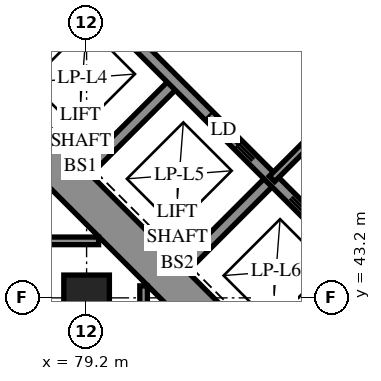
"""IFC4 building model, lengths in metres.
Left out: names, types, materials, properties, quantities, classifications, styles, units other than length and angle.
Written with IfcOpenShell. Run it as: python <this file> out.ifc"""

import sys

from ifc_helpers import new_model, si_unit, direction, frame, frame_2d, origin, origin_2d, place, context, subcontext, project, spatial, polyline, rectangle, outline, extrude, element, fill, save


model = new_model("IFC4")
c1 = context("Model", 3, precision=1e-05, world=origin(), true_north=direction((0.0, 1.0)))
c2 = subcontext(c1, "Body", "Model", "MODEL_VIEW")
j1 = project(units=[si_unit("LENGTHUNIT", "METRE"), si_unit("PLANEANGLEUNIT", "RADIAN")], contexts=[c1])
p1 = place(None, origin())
s1 = spatial("IfcSite", under=j1, at=p1, CompositionType="ELEMENT")
p2 = place(p1, origin())
s2 = spatial("IfcBuilding", under=s1, at=p2, CompositionType="ELEMENT")
p3 = place(p2, frame((0.0, 0.0, 22.8)))
s3 = spatial("IfcBuildingStorey", under=s2, at=p3, CompositionType="ELEMENT", Elevation=22.8)
p4 = place(p3, frame((79.2, 43.2, 0.0), z_axis=(0.0, 0.0, 1.0), x_axis=(1.0, 0.0, 0.0)))
e1 = element("IfcColumn", 1, at=p4, inside=s3, PredefinedType="COLUMN", context=c2, shape_type="SweptSolid", body=[
    extrude(rectangle(XDim=1.2, YDim=1.2, at=origin_2d()), origin(), (0.0, 0.0, 1.0), 3.9),
])
p5 = place(p3, frame((75.594, 49.443, -0.4), z_axis=(0.0, 0.0, 1.0), x_axis=(0.7071037324, -0.70710983, 0.0)))
e2 = element("IfcWall", 2, at=p5, inside=s3, PredefinedType="SHEAR", context=c2, shape_type="SweptSolid", body=[
    extrude(rectangle(XDim=16.4, YDim=1.0, at=frame_2d((8.2, 0.0))), origin(), (0.0, 0.0, 1.0), 3.6),
])
p6 = place(p3, frame((76.301, 49.443, -0.4), z_axis=(0.0, 0.0, 1.0), x_axis=(0.7071067812, 0.7071067812, 0.0)))
e3 = element("IfcWall", 3, at=p6, inside=s3, PredefinedType="SHEAR", context=c2, shape_type="SweptSolid", body=[
    extrude(rectangle(XDim=14.4, YDim=1.0, at=frame_2d((7.2, 0.0))), origin(), (0.0, 0.0, 1.0), 3.6),
])
p7 = place(p6, frame((4.55, 0.0, 0.4)))
e4 = element("IfcOpeningElement", 4, at=p7, cuts=e3, PredefinedType="OPENING", context=c2, shape_type="SweptSolid", body=[
    extrude(rectangle(XDim=1.1, YDim=2.1, at=frame_2d((0.55, 1.05))), frame((0.0, 0.51, 0.0), z_axis=(0.0, -1.0, 0.0), x_axis=(1.0, 0.0, 0.0)), (0.0, 0.0, 1.0), 1.02),
])
p8 = place(p6, frame((11.35, 0.0, 0.4)))
e5 = element("IfcOpeningElement", 5, at=p8, cuts=e3, PredefinedType="OPENING", context=c2, shape_type="SweptSolid", body=[
    extrude(rectangle(XDim=1.1, YDim=2.1, at=frame_2d((0.55, 1.05))), frame((0.0, 0.51, 0.0), z_axis=(0.0, -1.0, 0.0), x_axis=(1.0, 0.0, 0.0)), (0.0, 0.0, 1.0), 1.02),
])
p9 = place(p3, frame((79.2, 46.544, 0.0), z_axis=(0.0, 0.0, 1.0), x_axis=(0.7071219326, 0.7070916295, 0.0)))
e6 = element("IfcWall", 6, at=p9, inside=s3, PredefinedType="SOLIDWALL", context=c2, shape_type="SweptSolid", body=[
    extrude(rectangle(XDim=3.3, YDim=0.3, at=frame_2d((1.65, 0.0))), origin(), (0.0, 0.0, 1.0), 3.9),
])
for number, where, z_axis, x_axis in (
    (7, (81.746, 43.999, 0.0), (0.0, 0.0, 1.0), (0.707, 0.707, 0.0)),
    (8, (84.291, 41.453, 0.0), (0.0, 0.0, 1.0), (0.707, 0.707, 0.0)),
):
    element("IfcWall", number, at=place(p3, frame(where, z_axis=z_axis, x_axis=x_axis)), inside=s3, PredefinedType="SOLIDWALL", context=c2, shape_type="SweptSolid", body=[
        extrude(rectangle(XDim=3.3, YDim=0.3, at=frame_2d((1.65, 0.0))), origin(), (0.0, 0.0, 1.0), 3.9),
    ])
p10 = place(p3, frame((78.988, 51.423, 0.0), z_axis=(0.0, 0.0, 1.0), x_axis=(0.7071067812, -0.7071067812, 0.0)))
e9 = element("IfcWall", 9, at=p10, inside=s3, PredefinedType="SOLIDWALL", context=c2, shape_type="SweptSolid", body=[
    extrude(rectangle(XDim=14.4, YDim=0.3, at=frame_2d((7.2, 0.0))), origin(), (0.0, 0.0, 1.0), 3.9),
])
p11 = place(p10, frame((1.25, 0.0, 0.0)))
e10 = element("IfcOpeningElement", 10, at=p11, cuts=e9, PredefinedType="OPENING", context=c2, shape_type="SweptSolid", body=[
    extrude(rectangle(XDim=1.1, YDim=2.1, at=frame_2d((0.55, 1.05))), frame((0.0, 0.16, 0.0), z_axis=(0.0, -1.0, 0.0), x_axis=(1.0, 0.0, 0.0)), (0.0, 0.0, 1.0), 0.32),
])
p12 = place(p10, frame((4.85, 0.0, 0.0)))
e11 = element("IfcOpeningElement", 11, at=p12, cuts=e9, PredefinedType="OPENING", context=c2, shape_type="SweptSolid", body=[
    extrude(rectangle(XDim=1.1, YDim=2.1, at=frame_2d((0.55, 1.05))), frame((0.0, 0.16, 0.0), z_axis=(0.0, -1.0, 0.0), x_axis=(1.0, 0.0, 0.0)), (0.0, 0.0, 1.0), 0.32),
])
p13 = place(p10, frame((8.45, 0.0, 0.0)))
e12 = element("IfcOpeningElement", 12, at=p13, cuts=e9, PredefinedType="OPENING", context=c2, shape_type="SweptSolid", body=[
    extrude(rectangle(XDim=1.1, YDim=2.1, at=frame_2d((0.55, 1.05))), frame((0.0, 0.16, 0.0), z_axis=(0.0, -1.0, 0.0), x_axis=(1.0, 0.0, 0.0)), (0.0, 0.0, 1.0), 0.32),
])
p14 = place(p10, frame((12.05, 0.0, 0.0)))
e13 = element("IfcOpeningElement", 13, at=p14, cuts=e9, PredefinedType="OPENING", context=c2, shape_type="SweptSolid", body=[
    extrude(rectangle(XDim=1.1, YDim=2.1, at=frame_2d((0.55, 1.05))), frame((0.0, 0.16, 0.0), z_axis=(0.0, -1.0, 0.0), x_axis=(1.0, 0.0, 0.0)), (0.0, 0.0, 1.0), 0.32),
])
p15 = place(p3, frame((81.534, 53.969, 0.0), z_axis=(0.0, 0.0, 1.0), x_axis=(0.707103309, -0.7071102534, 0.0)))
e14 = element("IfcWall", 14, at=p15, inside=s3, PredefinedType="SOLIDWALL", context=c2, shape_type="SweptSolid", body=[
    extrude(rectangle(XDim=14.4, YDim=0.3, at=frame_2d((7.2, 0.0))), origin(), (0.0, 0.0, 1.0), 3.9),
])
p16 = place(p15, frame((12.05, 0.0, 0.0)))
e15 = element("IfcOpeningElement", 15, at=p16, cuts=e14, PredefinedType="OPENING", context=c2, shape_type="SweptSolid", body=[
    extrude(rectangle(XDim=1.1, YDim=2.1, at=frame_2d((0.55, 1.05))), frame((0.0, 0.16, 0.0), z_axis=(0.0, -1.0, 0.0), x_axis=(1.0, 0.0, 0.0)), (0.0, 0.0, 1.0), 0.32),
])
p17 = place(p3, frame((117.843, 34.665, 0.0), z_axis=(0.0, 0.0, 1.0), x_axis=(-0.7071067812, 0.7071067812, 0.0)))
e16 = element("IfcWall", 16, at=p17, inside=s3, PredefinedType="SOLIDWALL", context=c2, shape_type="SweptSolid", body=[
    extrude(outline(polyline([(-0.275, -0.275), (54.222, -0.275), (53.994, 0.275), (0.275, 0.275), (-0.275, -0.275)])), origin(), (0.0, 0.0, 1.0), 3.9),
])
p18 = place(p17, frame((0.8, 0.0, 0.7)))
e17 = element("IfcOpeningElement", 17, at=p18, cuts=e16, PredefinedType="OPENING", context=c2, shape_type="SweptSolid", body=[
    extrude(rectangle(XDim=1.8, YDim=2.4, at=frame_2d((0.9, 1.2))), frame((0.0, 0.285, 0.0), z_axis=(0.0, -1.0, 0.0), x_axis=(1.0, 0.0, 0.0)), (0.0, 0.0, 1.0), 0.57),
])
p19 = place(p17, frame((4.225, 0.0, 0.7)))
e18 = element("IfcOpeningElement", 18, at=p19, cuts=e16, PredefinedType="OPENING", context=c2, shape_type="SweptSolid", body=[
    extrude(rectangle(XDim=1.8, YDim=2.4, at=frame_2d((0.9, 1.2))), frame((0.0, 0.285, 0.0), z_axis=(0.0, -1.0, 0.0), x_axis=(1.0, 0.0, 0.0)), (0.0, 0.0, 1.0), 0.57),
])
p20 = place(p17, frame((7.825, 0.0, 0.7)))
e19 = element("IfcOpeningElement", 19, at=p20, cuts=e16, PredefinedType="OPENING", context=c2, shape_type="SweptSolid", body=[
    extrude(rectangle(XDim=1.8, YDim=2.4, at=frame_2d((0.9, 1.2))), frame((0.0, 0.285, 0.0), z_axis=(0.0, -1.0, 0.0), x_axis=(1.0, 0.0, 0.0)), (0.0, 0.0, 1.0), 0.57),
])
p21 = place(p17, frame((11.425, 0.0, 0.7)))
e20 = element("IfcOpeningElement", 20, at=p21, cuts=e16, PredefinedType="OPENING", context=c2, shape_type="SweptSolid", body=[
    extrude(rectangle(XDim=1.8, YDim=2.4, at=frame_2d((0.9, 1.2))), frame((0.0, 0.285, 0.0), z_axis=(0.0, -1.0, 0.0), x_axis=(1.0, 0.0, 0.0)), (0.0, 0.0, 1.0), 0.57),
])
p22 = place(p17, frame((15.025, 0.0, 0.7)))
e21 = element("IfcOpeningElement", 21, at=p22, cuts=e16, PredefinedType="OPENING", context=c2, shape_type="SweptSolid", body=[
    extrude(rectangle(XDim=1.8, YDim=2.4, at=frame_2d((0.9, 1.2))), frame((0.0, 0.285, 0.0), z_axis=(0.0, -1.0, 0.0), x_axis=(1.0, 0.0, 0.0)), (0.0, 0.0, 1.0), 0.57),
])
p23 = place(p17, frame((18.625, 0.0, 0.7)))
e22 = element("IfcOpeningElement", 22, at=p23, cuts=e16, PredefinedType="OPENING", context=c2, shape_type="SweptSolid", body=[
    extrude(rectangle(XDim=1.8, YDim=2.4, at=frame_2d((0.9, 1.2))), frame((0.0, 0.285, 0.0), z_axis=(0.0, -1.0, 0.0), x_axis=(1.0, 0.0, 0.0)), (0.0, 0.0, 1.0), 0.57),
])
p24 = place(p17, frame((22.225, 0.0, 0.7)))
e23 = element("IfcOpeningElement", 23, at=p24, cuts=e16, PredefinedType="OPENING", context=c2, shape_type="SweptSolid", body=[
    extrude(rectangle(XDim=1.8, YDim=2.4, at=frame_2d((0.9, 1.2))), frame((0.0, 0.285, 0.0), z_axis=(0.0, -1.0, 0.0), x_axis=(1.0, 0.0, 0.0)), (0.0, 0.0, 1.0), 0.57),
])
p25 = place(p17, frame((25.825, 0.0, 0.7)))
e24 = element("IfcOpeningElement", 24, at=p25, cuts=e16, PredefinedType="OPENING", context=c2, shape_type="SweptSolid", body=[
    extrude(rectangle(XDim=1.8, YDim=2.4, at=frame_2d((0.9, 1.2))), frame((0.0, 0.285, 0.0), z_axis=(0.0, -1.0, 0.0), x_axis=(1.0, 0.0, 0.0)), (0.0, 0.0, 1.0), 0.57),
])
p26 = place(p17, frame((29.425, 0.0, 0.7)))
e25 = element("IfcOpeningElement", 25, at=p26, cuts=e16, PredefinedType="OPENING", context=c2, shape_type="SweptSolid", body=[
    extrude(rectangle(XDim=1.8, YDim=2.4, at=frame_2d((0.9, 1.2))), frame((0.0, 0.285, 0.0), z_axis=(0.0, -1.0, 0.0), x_axis=(1.0, 0.0, 0.0)), (0.0, 0.0, 1.0), 0.57),
])
p27 = place(p17, frame((33.025, 0.0, 0.7)))
e26 = element("IfcOpeningElement", 26, at=p27, cuts=e16, PredefinedType="OPENING", context=c2, shape_type="SweptSolid", body=[
    extrude(rectangle(XDim=1.8, YDim=2.4, at=frame_2d((0.9, 1.2))), frame((0.0, 0.285, 0.0), z_axis=(0.0, -1.0, 0.0), x_axis=(1.0, 0.0, 0.0)), (0.0, 0.0, 1.0), 0.57),
])
p28 = place(p17, frame((36.625, 0.0, 0.7)))
e27 = element("IfcOpeningElement", 27, at=p28, cuts=e16, PredefinedType="OPENING", context=c2, shape_type="SweptSolid", body=[
    extrude(rectangle(XDim=1.8, YDim=2.4, at=frame_2d((0.9, 1.2))), frame((0.0, 0.285, 0.0), z_axis=(0.0, -1.0, 0.0), x_axis=(1.0, 0.0, 0.0)), (0.0, 0.0, 1.0), 0.57),
])
p29 = place(p17, frame((40.225, 0.0, 0.7)))
e28 = element("IfcOpeningElement", 28, at=p29, cuts=e16, PredefinedType="OPENING", context=c2, shape_type="SweptSolid", body=[
    extrude(rectangle(XDim=1.8, YDim=2.4, at=frame_2d((0.9, 1.2))), frame((0.0, 0.285, 0.0), z_axis=(0.0, -1.0, 0.0), x_axis=(1.0, 0.0, 0.0)), (0.0, 0.0, 1.0), 0.57),
])
p30 = place(p17, frame((43.825, 0.0, 0.7)))
e29 = element("IfcOpeningElement", 29, at=p30, cuts=e16, PredefinedType="OPENING", context=c2, shape_type="SweptSolid", body=[
    extrude(rectangle(XDim=1.8, YDim=2.4, at=frame_2d((0.9, 1.2))), frame((0.0, 0.285, 0.0), z_axis=(0.0, -1.0, 0.0), x_axis=(1.0, 0.0, 0.0)), (0.0, 0.0, 1.0), 0.57),
])
p31 = place(p17, frame((47.425, 0.0, 0.7)))
e30 = element("IfcOpeningElement", 30, at=p31, cuts=e16, PredefinedType="OPENING", context=c2, shape_type="SweptSolid", body=[
    extrude(rectangle(XDim=1.8, YDim=2.4, at=frame_2d((0.9, 1.2))), frame((0.0, 0.285, 0.0), z_axis=(0.0, -1.0, 0.0), x_axis=(1.0, 0.0, 0.0)), (0.0, 0.0, 1.0), 0.57),
])
p32 = place(p17, frame((51.06, 0.0, 0.7)))
e31 = element("IfcOpeningElement", 31, at=p32, cuts=e16, PredefinedType="OPENING", context=c2, shape_type="SweptSolid", body=[
    extrude(rectangle(XDim=1.8, YDim=2.4, at=frame_2d((0.9, 1.2))), frame((0.0, 0.285, 0.0), z_axis=(0.0, -1.0, 0.0), x_axis=(1.0, 0.0, 0.0)), (0.0, 0.0, 1.0), 0.57),
])
p33 = place(p3, frame((84.079, 46.332, 0.0), z_axis=(0.0, 0.0, 1.0), x_axis=(0.7071067812, 0.7071067812, 0.0)))
e32 = element("IfcWall", 32, at=p33, inside=s3, PredefinedType="PARTITIONING", context=c2, shape_type="SweptSolid", body=[
    extrude(rectangle(XDim=3.6, YDim=0.2, at=frame_2d((1.8, 0.0))), origin(), (0.0, 0.0, 1.0), 3.9),
])
for number, where, z_axis, x_axis in (
    (33, (77.702, 44.7, 0.0), (0.0, 0.0, 1.0), (1.0, 0.0, 0.0)),
    (34, (80.7, 41.702, 0.0), (0.0, 0.0, 1.0), (0.0, 1.0, 0.0)),
):
    element("IfcWall", number, at=place(p3, frame(where, z_axis=z_axis, x_axis=x_axis)), inside=s3, PredefinedType="PARTITIONING", context=c2, shape_type="SweptSolid", body=[
        extrude(rectangle(XDim=1.814, YDim=0.2, at=frame_2d((0.907, 0.0))), origin(), (0.0, 0.0, 1.0), 3.9),
    ])
p34 = place(p12, origin())
e35 = element("IfcDoor", 35, at=p34, inside=s3, OperationType="SLIDING_TO_RIGHT", PredefinedType="DOOR", context=c2, shape_type="SweptSolid", body=[
    extrude(rectangle(XDim=1.1, YDim=2.1, at=frame_2d((0.55, 1.05))), frame((0.0, 0.025, 0.0), z_axis=(0.0, -1.0, 0.0), x_axis=(1.0, 0.0, 0.0)), (0.0, 0.0, 1.0), 0.05),
])
fill(e11, e35)
save(model, sys.argv[1])
